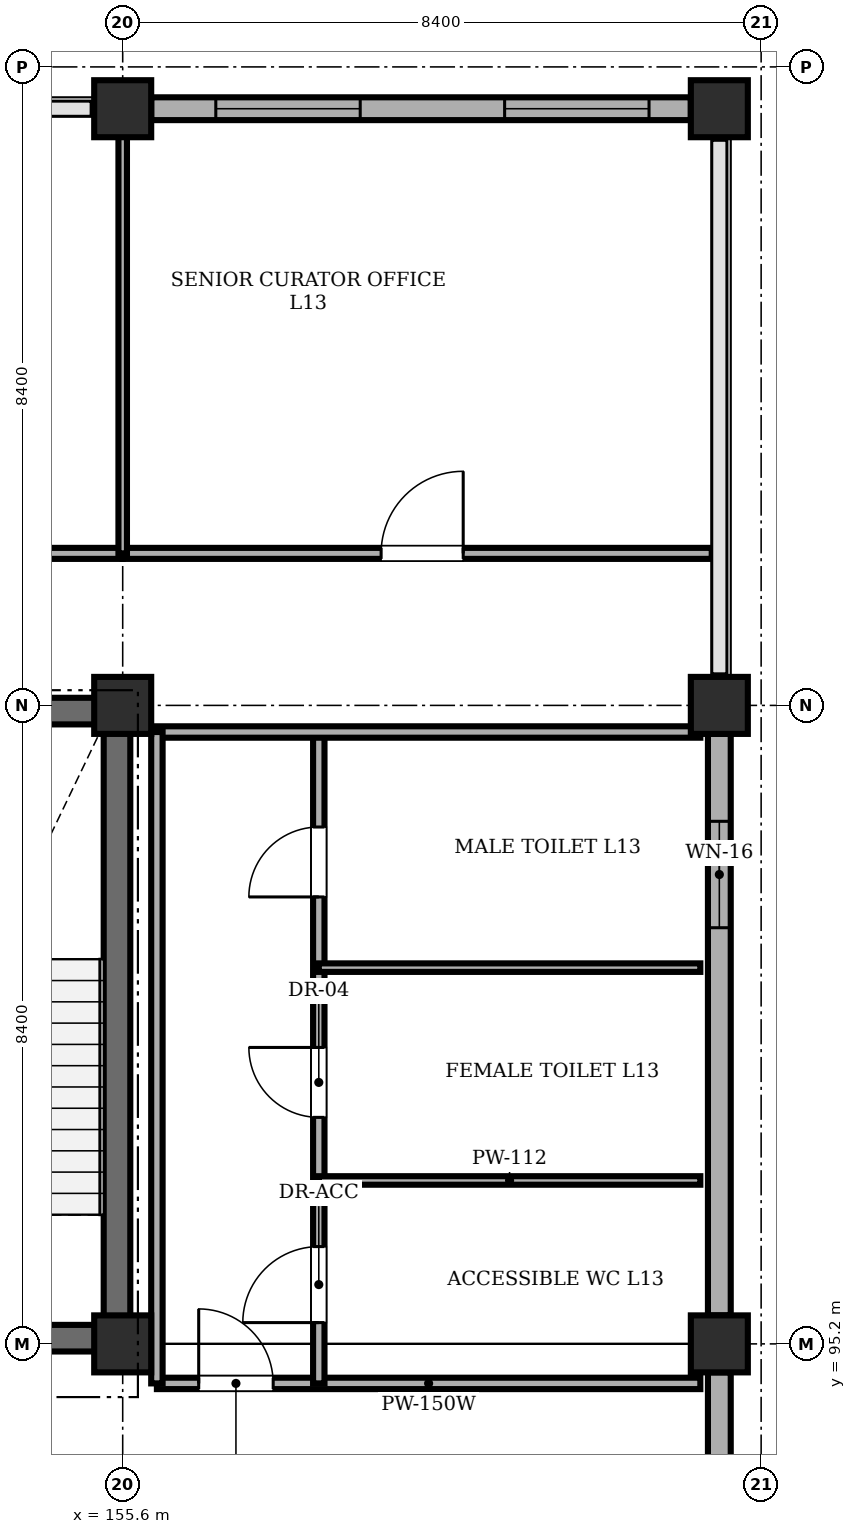
"""IFC4 building model, lengths in metres.
Left out: names, types, materials, properties, quantities, classifications, styles, units other than length and angle.
Written with IfcOpenShell. Run it as: python <this file> out.ifc"""

import sys

from ifc_helpers import new_model, si_unit, direction, frame, frame_2d, origin, origin_2d, place, context, subcontext, project, spatial, rectangle, extrude, element, fill, save


model = new_model("IFC4")
c1 = context("Model", 3, precision=1e-05, world=origin(), true_north=direction((0.0, 1.0)))
c2 = subcontext(c1, "Body", "Model", "MODEL_VIEW")
j1 = project(units=[si_unit("LENGTHUNIT", "METRE"), si_unit("PLANEANGLEUNIT", "RADIAN")], contexts=[c1])
p1 = place(None, origin())
s1 = spatial("IfcSite", under=j1, at=p1, CompositionType="ELEMENT")
p2 = place(p1, origin())
s2 = spatial("IfcBuilding", under=s1, at=p2, CompositionType="ELEMENT")
p3 = place(p2, frame((0.0, 0.0, 52.8)))
s3 = spatial("IfcBuildingStorey", under=s2, at=p3, CompositionType="ELEMENT", Elevation=52.8)
for number, where, z_axis, x_axis in (
    (1, (155.6, 95.2, 0.0), (0.0, 0.0, 1.0), (1.0, 0.0, 0.0)),
    (2, (155.6, 103.6, 0.0), (0.0, 0.0, 1.0), (1.0, 0.0, 0.0)),
    (3, (155.6, 111.45, 0.0), (0.0, 0.0, 1.0), (1.0, 0.0, 0.0)),
    (4, (163.45, 95.2, 0.0), (0.0, 0.0, 1.0), (1.0, 0.0, 0.0)),
    (5, (163.45, 103.6, 0.0), (0.0, 0.0, 1.0), (1.0, 0.0, 0.0)),
    (6, (163.45, 111.45, 0.0), (0.0, 0.0, 1.0), (1.0, 0.0, 0.0)),
):
    element("IfcColumn", number, at=place(p3, frame(where, z_axis=z_axis, x_axis=x_axis)), inside=s3, PredefinedType="COLUMN", context=c2, shape_type="SweptSolid", body=[
        extrude(rectangle(XDim=0.75, YDim=0.75, at=origin_2d()), origin(), (0.0, 0.0, 1.0), 4.03),
    ])
for number, where, z_axis, x_axis in (
    (7, (151.9, 95.275, 0.0), (0.0, 0.0, 1.0), (1.0, 0.0, 0.0)),
    (8, (151.9, 103.525, 0.0), (0.0, 0.0, 1.0), (1.0, 0.0, 0.0)),
):
    element("IfcWall", number, at=place(p3, frame(where, z_axis=z_axis, x_axis=x_axis)), inside=s3, PredefinedType="SHEAR", context=c2, shape_type="SweptSolid", body=[
        extrude(rectangle(XDim=3.8, YDim=0.35, at=frame_2d((1.9, 0.0))), origin(), (0.0, 0.0, 1.0), 4.03),
    ])
p4 = place(p3, frame((155.525, 95.45, 0.0), z_axis=(0.0, 0.0, 1.0), x_axis=(0.0, 1.0, 0.0)))
e9 = element("IfcWall", 9, at=p4, inside=s3, PredefinedType="SHEAR", context=c2, shape_type="SweptSolid", body=[
    extrude(rectangle(XDim=7.9, YDim=0.35, at=frame_2d((3.95, 0.0))), origin(), (0.0, 0.0, 1.0), 4.03),
])
p5 = place(p3, frame((155.975, 111.45, 0.0), z_axis=(0.0, 0.0, 1.0), x_axis=(1.0, 0.0, 0.0)))
e10 = element("IfcWall", 10, at=p5, inside=s3, PredefinedType="STANDARD", context=c2, shape_type="SweptSolid", body=[
    extrude(rectangle(XDim=7.1, YDim=0.3, at=frame_2d((3.55, 0.0))), origin(), (0.0, 0.0, 1.0), 3.33),
])
p6 = place(p5, frame((0.85, 0.0, 0.9)))
e11 = element("IfcOpeningElement", 11, at=p6, cuts=e10, PredefinedType="OPENING", context=c2, shape_type="SweptSolid", body=[
    extrude(rectangle(XDim=1.9, YDim=2.1, at=frame_2d((0.95, 1.05))), frame((0.0, 0.16, 0.0), z_axis=(0.0, -1.0, 0.0), x_axis=(1.0, 0.0, 0.0)), (0.0, 0.0, 1.0), 0.32),
])
p7 = place(p5, frame((4.65, 0.0, 0.9)))
e12 = element("IfcOpeningElement", 12, at=p7, cuts=e10, PredefinedType="OPENING", context=c2, shape_type="SweptSolid", body=[
    extrude(rectangle(XDim=1.9, YDim=2.1, at=frame_2d((0.95, 1.05))), frame((0.0, 0.16, 0.0), z_axis=(0.0, -1.0, 0.0), x_axis=(1.0, 0.0, 0.0)), (0.0, 0.0, 1.0), 0.32),
])
p8 = place(p3, frame((163.45, 94.825, 0.0), z_axis=(0.0, 0.0, 1.0), x_axis=(0.0, -1.0, 0.0)))
e13 = element("IfcWall", 13, at=p8, inside=s3, PredefinedType="STANDARD", context=c2, shape_type="SweptSolid", body=[
    extrude(rectangle(XDim=7.65, YDim=0.3, at=frame_2d((3.825, 0.0))), origin(), (0.0, 0.0, 1.0), 3.33),
])
p9 = place(p8, frame((4.2, 0.0, 1.1)))
e14 = element("IfcOpeningElement", 14, at=p9, cuts=e13, PredefinedType="OPENING", context=c2, shape_type="SweptSolid", body=[
    extrude(rectangle(XDim=1.8, YDim=1.8, at=frame_2d((0.9, 0.9))), frame((0.0, 0.16, 0.0), z_axis=(0.0, -1.0, 0.0), x_axis=(1.0, 0.0, 0.0)), (0.0, 0.0, 1.0), 0.32),
])
p10 = place(p3, frame((163.45, 103.225, 0.0), z_axis=(0.0, 0.0, 1.0), x_axis=(0.0, -1.0, 0.0)))
e15 = element("IfcWall", 15, at=p10, inside=s3, PredefinedType="STANDARD", context=c2, shape_type="SweptSolid", body=[
    extrude(rectangle(XDim=7.65, YDim=0.3, at=frame_2d((3.825, 0.0))), origin(), (0.0, 0.0, 1.0), 3.33),
])
p11 = place(p10, frame((1.15, 0.0, 1.1)))
e16 = element("IfcOpeningElement", 16, at=p11, cuts=e15, PredefinedType="OPENING", context=c2, shape_type="SweptSolid", body=[
    extrude(rectangle(XDim=1.4, YDim=1.4, at=frame_2d((0.7, 0.7))), frame((0.0, 0.16, 0.0), z_axis=(0.0, -1.0, 0.0), x_axis=(1.0, 0.0, 0.0)), (0.0, 0.0, 1.0), 0.32),
])
p12 = place(p3, frame((156.05, 94.68, 0.0), z_axis=(0.0, 0.0, 1.0), x_axis=(1.0, 0.0, 0.0)))
e17 = element("IfcWall", 17, at=p12, inside=s3, PredefinedType="PARTITIONING", context=c2, shape_type="SweptSolid", body=[
    extrude(rectangle(XDim=7.15, YDim=0.15, at=frame_2d((3.575, 0.0))), origin(), (0.0, 0.0, 1.0), 4.03),
])
p13 = place(p12, frame((0.55, 0.0, 0.0)))
e18 = element("IfcOpeningElement", 18, at=p13, cuts=e17, PredefinedType="OPENING", context=c2, shape_type="SweptSolid", body=[
    extrude(rectangle(XDim=0.98, YDim=2.12, at=frame_2d((0.49, 1.06))), frame((0.0, 0.085, 0.0), z_axis=(0.0, -1.0, 0.0), x_axis=(1.0, 0.0, 0.0)), (0.0, 0.0, 1.0), 0.17),
])
p14 = place(p3, frame((158.18, 94.68, 0.0), z_axis=(0.0, 0.0, 1.0), x_axis=(0.0, 1.0, 0.0)))
e19 = element("IfcWall", 19, at=p14, inside=s3, PredefinedType="PARTITIONING", context=c2, shape_type="SweptSolid", body=[
    extrude(rectangle(XDim=8.57, YDim=0.15, at=frame_2d((4.285, 0.0))), origin(), (0.0, 0.0, 1.0), 4.03),
])
p15 = place(p14, frame((0.8, 0.0, 0.0)))
e20 = element("IfcOpeningElement", 20, at=p15, cuts=e19, PredefinedType="OPENING", context=c2, shape_type="SweptSolid", body=[
    extrude(rectangle(XDim=1.0, YDim=2.12, at=frame_2d((0.5, 1.06))), frame((0.0, 0.085, 0.0), z_axis=(0.0, -1.0, 0.0), x_axis=(1.0, 0.0, 0.0)), (0.0, 0.0, 1.0), 0.17),
])
p16 = place(p14, frame((3.5, 0.0, 0.0)))
e21 = element("IfcOpeningElement", 21, at=p16, cuts=e19, PredefinedType="OPENING", context=c2, shape_type="SweptSolid", body=[
    extrude(rectangle(XDim=0.92, YDim=2.1, at=frame_2d((0.46, 1.05))), frame((0.0, 0.085, 0.0), z_axis=(0.0, -1.0, 0.0), x_axis=(1.0, 0.0, 0.0)), (0.0, 0.0, 1.0), 0.17),
])
p17 = place(p14, frame((6.4, 0.0, 0.0)))
e22 = element("IfcOpeningElement", 22, at=p17, cuts=e19, PredefinedType="OPENING", context=c2, shape_type="SweptSolid", body=[
    extrude(rectangle(XDim=0.92, YDim=2.1, at=frame_2d((0.46, 1.05))), frame((0.0, 0.085, 0.0), z_axis=(0.0, -1.0, 0.0), x_axis=(1.0, 0.0, 0.0)), (0.0, 0.0, 1.0), 0.17),
])
for number, where, z_axis, x_axis in (
    (23, (158.18, 97.35, 0.0), (0.0, 0.0, 1.0), (1.0, 0.0, 0.0)),
    (24, (158.18, 100.15, 0.0), (0.0, 0.0, 1.0), (1.0, 0.0, 0.0)),
):
    element("IfcWall", number, at=place(p3, frame(where, z_axis=z_axis, x_axis=x_axis)), inside=s3, PredefinedType="PARTITIONING", context=c2, shape_type="SweptSolid", body=[
        extrude(rectangle(XDim=5.02, YDim=0.112, at=frame_2d((2.51, 0.0))), origin(), (0.0, 0.0, 1.0), 4.03),
    ])
p18 = place(p3, frame((156.05, 103.25, 0.0), z_axis=(0.0, 0.0, 1.0), x_axis=(1.0, 0.0, 0.0)))
e25 = element("IfcWall", 25, at=p18, inside=s3, PredefinedType="PARTITIONING", context=c2, shape_type="SweptSolid", body=[
    extrude(rectangle(XDim=7.15, YDim=0.15, at=frame_2d((3.575, 0.0))), origin(), (0.0, 0.0, 1.0), 4.03),
])
p19 = place(p3, frame((156.05, 94.68, 0.0), z_axis=(0.0, 0.0, 1.0), x_axis=(0.0, 1.0, 0.0)))
e26 = element("IfcWall", 26, at=p19, inside=s3, PredefinedType="PARTITIONING", context=c2, shape_type="SweptSolid", body=[
    extrude(rectangle(XDim=8.57, YDim=0.15, at=frame_2d((4.285, 0.0))), origin(), (0.0, 0.0, 1.0), 4.03),
])
p20 = place(p3, frame((147.2, 105.6, 0.0), z_axis=(0.0, 0.0, 1.0), x_axis=(1.0, 0.0, 0.0)))
e27 = element("IfcWall", 27, at=p20, inside=s3, PredefinedType="PARTITIONING", context=c2, shape_type="SweptSolid", body=[
    extrude(rectangle(XDim=8.4, YDim=0.145, at=frame_2d((4.2, 0.0))), origin(), (0.0, 0.0, 1.0), 4.03),
])
p21 = place(p20, frame((3.4, 0.0, 0.0)))
e28 = element("IfcOpeningElement", 28, at=p21, cuts=e27, PredefinedType="OPENING", context=c2, shape_type="SweptSolid", body=[
    extrude(rectangle(XDim=1.32, YDim=2.2, at=frame_2d((0.66, 1.1))), frame((0.0, 0.083, 0.0), z_axis=(0.0, -1.0, 0.0), x_axis=(1.0, 0.0, 0.0)), (0.0, 0.0, 1.0), 0.165),
])
p22 = place(p3, frame((155.6, 105.6, 0.0), z_axis=(0.0, 0.0, 1.0), x_axis=(1.0, 0.0, 0.0)))
e29 = element("IfcWall", 29, at=p22, inside=s3, PredefinedType="PARTITIONING", context=c2, shape_type="SweptSolid", body=[
    extrude(rectangle(XDim=7.75, YDim=0.145, at=frame_2d((3.875, 0.0))), origin(), (0.0, 0.0, 1.0), 4.03),
])
p23 = place(p22, frame((3.4, 0.0, 0.0)))
e30 = element("IfcOpeningElement", 30, at=p23, cuts=e29, PredefinedType="OPENING", context=c2, shape_type="SweptSolid", body=[
    extrude(rectangle(XDim=1.08, YDim=2.15, at=frame_2d((0.54, 1.075))), frame((0.0, 0.083, 0.0), z_axis=(0.0, -1.0, 0.0), x_axis=(1.0, 0.0, 0.0)), (0.0, 0.0, 1.0), 0.165),
])
p24 = place(p3, frame((155.6, 105.6, 0.0), z_axis=(0.0, 0.0, 1.0), x_axis=(0.0, 1.0, 0.0)))
e31 = element("IfcWall", 31, at=p24, inside=s3, PredefinedType="PARTITIONING", context=c2, shape_type="SweptSolid", body=[
    extrude(rectangle(XDim=5.75, YDim=0.112, at=frame_2d((2.875, 0.0))), origin(), (0.0, 0.0, 1.0), 3.33),
])
p25 = place(p6, origin())
e32 = element("IfcWindow", 32, at=p25, inside=s3, PartitioningType="DOUBLE_PANEL_VERTICAL", PredefinedType="WINDOW", context=c2, shape_type="SweptSolid", body=[
    extrude(rectangle(XDim=1.9, YDim=2.1, at=frame_2d((0.95, 1.05))), frame((0.0, 0.03, 0.0), z_axis=(0.0, -1.0, 0.0), x_axis=(1.0, 0.0, 0.0)), (0.0, 0.0, 1.0), 0.06),
])
fill(e11, e32)
p26 = place(p7, origin())
e33 = element("IfcWindow", 33, at=p26, inside=s3, PartitioningType="DOUBLE_PANEL_VERTICAL", PredefinedType="WINDOW", context=c2, shape_type="SweptSolid", body=[
    extrude(rectangle(XDim=1.9, YDim=2.1, at=frame_2d((0.95, 1.05))), frame((0.0, 0.03, 0.0), z_axis=(0.0, -1.0, 0.0), x_axis=(1.0, 0.0, 0.0)), (0.0, 0.0, 1.0), 0.06),
])
fill(e12, e33)
p27 = place(p11, origin())
e34 = element("IfcWindow", 34, at=p27, inside=s3, PartitioningType="SINGLE_PANEL", PredefinedType="WINDOW", context=c2, shape_type="SweptSolid", body=[
    extrude(rectangle(XDim=1.4, YDim=1.4, at=frame_2d((0.7, 0.7))), frame((0.0, 0.03, 0.0), z_axis=(0.0, -1.0, 0.0), x_axis=(1.0, 0.0, 0.0)), (0.0, 0.0, 1.0), 0.06),
])
fill(e16, e34)
p28 = place(p13, origin())
e35 = element("IfcDoor", 35, at=p28, inside=s3, OperationType="SINGLE_SWING_LEFT", PredefinedType="DOOR", context=c2, shape_type="SweptSolid", body=[
    extrude(rectangle(XDim=0.98, YDim=2.12, at=frame_2d((0.49, 1.06))), frame((0.0, 0.025, 0.0), z_axis=(0.0, -1.0, 0.0), x_axis=(1.0, 0.0, 0.0)), (0.0, 0.0, 1.0), 0.05),
])
fill(e18, e35)
p29 = place(p15, origin())
e36 = element("IfcDoor", 36, at=p29, inside=s3, OperationType="SINGLE_SWING_LEFT", PredefinedType="DOOR", context=c2, shape_type="SweptSolid", body=[
    extrude(rectangle(XDim=1.0, YDim=2.12, at=frame_2d((0.5, 1.06))), frame((0.0, 0.025, 0.0), z_axis=(0.0, -1.0, 0.0), x_axis=(1.0, 0.0, 0.0)), (0.0, 0.0, 1.0), 0.05),
])
fill(e20, e36)
p30 = place(p16, origin())
e37 = element("IfcDoor", 37, at=p30, inside=s3, OperationType="SINGLE_SWING_RIGHT", PredefinedType="DOOR", context=c2, shape_type="SweptSolid", body=[
    extrude(rectangle(XDim=0.92, YDim=2.1, at=frame_2d((0.46, 1.05))), frame((0.0, 0.025, 0.0), z_axis=(0.0, -1.0, 0.0), x_axis=(1.0, 0.0, 0.0)), (0.0, 0.0, 1.0), 0.05),
])
fill(e21, e37)
p31 = place(p17, origin())
e38 = element("IfcDoor", 38, at=p31, inside=s3, OperationType="SINGLE_SWING_LEFT", PredefinedType="DOOR", context=c2, shape_type="SweptSolid", body=[
    extrude(rectangle(XDim=0.92, YDim=2.1, at=frame_2d((0.46, 1.05))), frame((0.0, 0.025, 0.0), z_axis=(0.0, -1.0, 0.0), x_axis=(1.0, 0.0, 0.0)), (0.0, 0.0, 1.0), 0.05),
])
fill(e22, e38)
p32 = place(p23, origin())
e39 = element("IfcDoor", 39, at=p32, inside=s3, OperationType="SINGLE_SWING_RIGHT", PredefinedType="DOOR", context=c2, shape_type="SweptSolid", body=[
    extrude(rectangle(XDim=1.08, YDim=2.15, at=frame_2d((0.54, 1.075))), frame((0.0, 0.025, 0.0), z_axis=(0.0, -1.0, 0.0), x_axis=(1.0, 0.0, 0.0)), (0.0, 0.0, 1.0), 0.05),
])
fill(e30, e39)
save(model, sys.argv[1])
